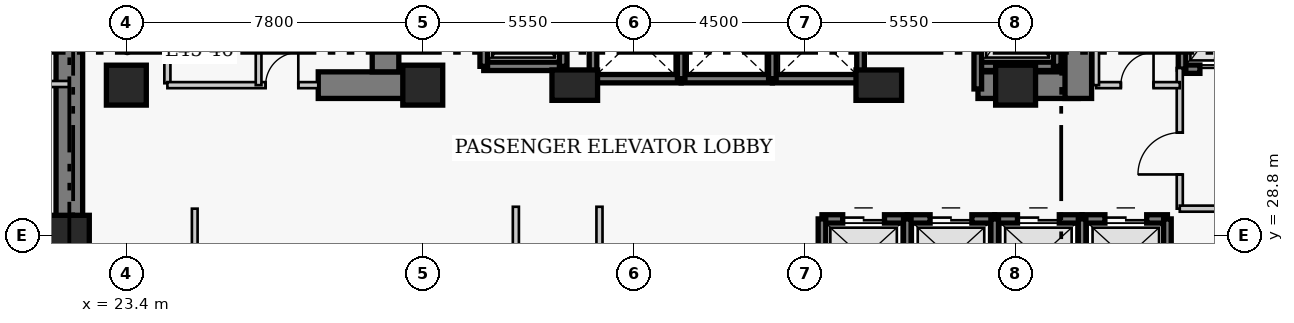
"""IFC4 building model, lengths in metres.
Left out: names, types, materials, properties, quantities, classifications, styles, units other than length and angle.
Written with IfcOpenShell. Run it as: python <this file> out.ifc"""

import sys

from ifc_helpers import new_model, si_unit, direction, frame, frame_2d, origin, origin_2d, place, context, subcontext, project, spatial, rectangle, extrude, element, fill, save


model = new_model("IFC4")
c1 = context("Model", 3, precision=1e-05, world=origin(), true_north=direction((0.0, 1.0)))
c2 = subcontext(c1, "Body", "Model", "MODEL_VIEW")
j1 = project(units=[si_unit("LENGTHUNIT", "METRE"), si_unit("PLANEANGLEUNIT", "RADIAN")], contexts=[c1])
p1 = place(None, origin())
s1 = spatial("IfcSite", under=j1, at=p1, CompositionType="ELEMENT")
p2 = place(p1, origin())
s2 = spatial("IfcBuilding", under=s1, at=p2, CompositionType="ELEMENT")
p3 = place(p2, frame((0.0, 0.0, 180.2)))
s3 = spatial("IfcBuildingStorey", under=s2, at=p3, CompositionType="ELEMENT", Elevation=180.2)
p4 = place(p3, frame((21.9, 27.05, 0.0), z_axis=(0.0, 0.0, 1.0), x_axis=(0.0, 1.0, 0.0)))
e1 = element("IfcWall", 1, at=p4, inside=s3, PredefinedType="SHEAR", context=c2, shape_type="SweptSolid", body=[
    extrude(rectangle(XDim=13.62, YDim=0.7, at=frame_2d((6.81, 0.0))), origin(), (0.0, 0.0, 1.0), 3.8),
])
p5 = place(p3, frame((28.45, 32.75, 0.0), z_axis=(0.0, 0.0, 1.0), x_axis=(1.0, 0.0, 0.0)))
e2 = element("IfcWall", 2, at=p5, inside=s3, PredefinedType="SHEAR", context=c2, shape_type="SweptSolid", body=[
    extrude(rectangle(XDim=2.4, YDim=0.7, at=frame_2d((1.2, 0.0))), origin(), (0.0, 0.0, 1.0), 3.8),
])
p6 = place(p3, frame((45.81, 32.75, 0.0), z_axis=(0.0, 0.0, 1.0), x_axis=(1.0, 0.0, 0.0)))
e3 = element("IfcWall", 3, at=p6, inside=s3, PredefinedType="SHEAR", context=c2, shape_type="SweptSolid", body=[
    extrude(rectangle(XDim=2.64, YDim=0.7, at=frame_2d((1.32, 0.0))), origin(), (0.0, 0.0, 1.0), 3.8),
])
p7 = place(p3, frame((30.22, 33.1, 0.0), z_axis=(0.0, 0.0, 1.0), x_axis=(0.0, 1.0, 0.0)))
e4 = element("IfcWall", 4, at=p7, inside=s3, PredefinedType="SHEAR", context=c2, shape_type="SweptSolid", body=[
    extrude(rectangle(XDim=7.22, YDim=0.7, at=frame_2d((3.61, 0.0))), origin(), (0.0, 0.0, 1.0), 3.8),
])
p8 = place(p3, frame((48.45, 32.4, 0.0), z_axis=(0.0, 0.0, 1.0), x_axis=(0.0, 1.0, 0.0)))
e5 = element("IfcWall", 5, at=p8, inside=s3, PredefinedType="SHEAR", context=c2, shape_type="SweptSolid", body=[
    extrude(rectangle(XDim=7.92, YDim=0.7, at=frame_2d((3.96, 0.0))), origin(), (0.0, 0.0, 1.0), 3.8),
])
p9 = place(p8, frame((5.8, 0.0, 0.0)))
e6 = element("IfcOpeningElement", 6, at=p9, cuts=e5, PredefinedType="OPENING", context=c2, shape_type="SweptSolid", body=[
    extrude(rectangle(XDim=1.1, YDim=2.15, at=frame_2d((0.55, 1.075))), frame((0.0, 0.36, 0.0), z_axis=(0.0, -1.0, 0.0), x_axis=(1.0, 0.0, 0.0)), (0.0, 0.0, 1.0), 0.72),
])
for number, where, z_axis, x_axis in (
    (7, (21.9, 28.8, 0.0), (0.0, 0.0, 1.0), (1.0, 0.0, 0.0)),
    (8, (23.4, 32.75, 0.0), (0.0, 0.0, 1.0), (1.0, 0.0, 0.0)),
    (9, (31.2, 32.75, 0.0), (0.0, 0.0, 1.0), (1.0, 0.0, 0.0)),
):
    element("IfcColumn", number, at=place(p3, frame(where, z_axis=z_axis, x_axis=x_axis)), inside=s3, PredefinedType="COLUMN", context=c2, shape_type="SweptSolid", body=[
        extrude(rectangle(XDim=1.05, YDim=1.05, at=origin_2d()), origin(), (0.0, 0.0, 1.0), 3.8),
    ])
for number, where, z_axis, x_axis in (
    (10, (35.2, 32.75, 0.0), (0.0, 0.0, 1.0), (1.0, 0.0, 0.0)),
    (11, (43.2, 32.75, 0.0), (0.0, 0.0, 1.0), (1.0, 0.0, 0.0)),
):
    element("IfcColumn", number, at=place(p3, frame(where, z_axis=z_axis, x_axis=x_axis)), inside=s3, PredefinedType="COLUMN", context=c2, shape_type="SweptSolid", body=[
        extrude(rectangle(XDim=1.2, YDim=0.8, at=origin_2d()), origin(), (0.0, 0.0, 1.0), 3.8),
    ])
p10 = place(p3, frame((46.8, 32.75, 0.0), z_axis=(0.0, 0.0, 1.0), x_axis=(1.0, 0.0, 0.0)))
e12 = element("IfcColumn", 12, at=p10, inside=s3, PredefinedType="COLUMN", context=c2, shape_type="SweptSolid", body=[
    extrude(rectangle(XDim=1.05, YDim=1.05, at=origin_2d()), origin(), (0.0, 0.0, 1.0), 3.8),
])
p11 = place(p3, frame((41.705, 29.23, 0.0), z_axis=(0.0, 0.0, 1.0), x_axis=(1.0, 0.0, 0.0)))
e13 = element("IfcWall", 13, at=p11, inside=s3, PredefinedType="SHEAR", context=c2, shape_type="SweptSolid", body=[
    extrude(rectangle(XDim=2.245, YDim=0.22, at=frame_2d((1.123, 0.0))), origin(), (0.0, 0.0, 1.0), 3.8),
])
p12 = place(p11, frame((0.545, 0.0, 0.0)))
e14 = element("IfcOpeningElement", 14, at=p12, cuts=e13, PredefinedType="OPENING", context=c2, shape_type="SweptSolid", body=[
    extrude(rectangle(XDim=1.1, YDim=2.15, at=frame_2d((0.55, 1.075))), frame((0.0, 0.12, 0.0), z_axis=(0.0, -1.0, 0.0), x_axis=(1.0, 0.0, 0.0)), (0.0, 0.0, 1.0), 0.24),
])
p13 = place(p3, frame((41.705, 27.17, 0.0), z_axis=(0.0, 0.0, 1.0), x_axis=(0.0, 1.0, 0.0)))
e15 = element("IfcWall", 15, at=p13, inside=s3, PredefinedType="SHEAR", context=c2, shape_type="SweptSolid", body=[
    extrude(rectangle(XDim=2.06, YDim=0.2, at=frame_2d((1.03, 0.0))), origin(), (0.0, 0.0, 1.0), 3.8),
])
p14 = place(p3, frame((43.95, 29.23, 0.0), z_axis=(0.0, 0.0, 1.0), x_axis=(1.0, 0.0, 0.0)))
e16 = element("IfcWall", 16, at=p14, inside=s3, PredefinedType="SHEAR", context=c2, shape_type="SweptSolid", body=[
    extrude(rectangle(XDim=2.3, YDim=0.22, at=frame_2d((1.15, 0.0))), origin(), (0.0, 0.0, 1.0), 3.8),
])
p15 = place(p14, frame((0.6, 0.0, 0.0)))
e17 = element("IfcOpeningElement", 17, at=p15, cuts=e16, PredefinedType="OPENING", context=c2, shape_type="SweptSolid", body=[
    extrude(rectangle(XDim=1.1, YDim=2.15, at=frame_2d((0.55, 1.075))), frame((0.0, 0.12, 0.0), z_axis=(0.0, -1.0, 0.0), x_axis=(1.0, 0.0, 0.0)), (0.0, 0.0, 1.0), 0.24),
])
p16 = place(p3, frame((43.95, 27.17, 0.0), z_axis=(0.0, 0.0, 1.0), x_axis=(0.0, 1.0, 0.0)))
e18 = element("IfcWall", 18, at=p16, inside=s3, PredefinedType="SHEAR", context=c2, shape_type="SweptSolid", body=[
    extrude(rectangle(XDim=2.06, YDim=0.2, at=frame_2d((1.03, 0.0))), origin(), (0.0, 0.0, 1.0), 3.8),
])
p17 = place(p3, frame((46.25, 29.23, 0.0), z_axis=(0.0, 0.0, 1.0), x_axis=(1.0, 0.0, 0.0)))
e19 = element("IfcWall", 19, at=p17, inside=s3, PredefinedType="SHEAR", context=c2, shape_type="SweptSolid", body=[
    extrude(rectangle(XDim=2.3, YDim=0.22, at=frame_2d((1.15, 0.0))), origin(), (0.0, 0.0, 1.0), 3.8),
])
p18 = place(p17, frame((0.6, 0.0, 0.0)))
e20 = element("IfcOpeningElement", 20, at=p18, cuts=e19, PredefinedType="OPENING", context=c2, shape_type="SweptSolid", body=[
    extrude(rectangle(XDim=1.1, YDim=2.15, at=frame_2d((0.55, 1.075))), frame((0.0, 0.12, 0.0), z_axis=(0.0, -1.0, 0.0), x_axis=(1.0, 0.0, 0.0)), (0.0, 0.0, 1.0), 0.24),
])
p19 = place(p3, frame((46.25, 27.17, 0.0), z_axis=(0.0, 0.0, 1.0), x_axis=(0.0, 1.0, 0.0)))
e21 = element("IfcWall", 21, at=p19, inside=s3, PredefinedType="SHEAR", context=c2, shape_type="SweptSolid", body=[
    extrude(rectangle(XDim=2.06, YDim=0.2, at=frame_2d((1.03, 0.0))), origin(), (0.0, 0.0, 1.0), 3.8),
])
p20 = place(p3, frame((48.55, 29.23, 0.0), z_axis=(0.0, 0.0, 1.0), x_axis=(1.0, 0.0, 0.0)))
e22 = element("IfcWall", 22, at=p20, inside=s3, PredefinedType="SHEAR", context=c2, shape_type="SweptSolid", body=[
    extrude(rectangle(XDim=2.245, YDim=0.22, at=frame_2d((1.123, 0.0))), origin(), (0.0, 0.0, 1.0), 3.8),
])
p21 = place(p20, frame((0.6, 0.0, 0.0)))
e23 = element("IfcOpeningElement", 23, at=p21, cuts=e22, PredefinedType="OPENING", context=c2, shape_type="SweptSolid", body=[
    extrude(rectangle(XDim=1.1, YDim=2.15, at=frame_2d((0.55, 1.075))), frame((0.0, 0.12, 0.0), z_axis=(0.0, -1.0, 0.0), x_axis=(1.0, 0.0, 0.0)), (0.0, 0.0, 1.0), 0.24),
])
for number, where, z_axis, x_axis in (
    (24, (48.55, 27.17, 0.0), (0.0, 0.0, 1.0), (0.0, 1.0, 0.0)),
    (25, (50.795, 27.17, 0.0), (0.0, 0.0, 1.0), (0.0, 1.0, 0.0)),
):
    element("IfcWall", number, at=place(p3, frame(where, z_axis=z_axis, x_axis=x_axis)), inside=s3, PredefinedType="SHEAR", context=c2, shape_type="SweptSolid", body=[
        extrude(rectangle(XDim=2.06, YDim=0.2, at=frame_2d((1.03, 0.0))), origin(), (0.0, 0.0, 1.0), 3.8),
    ])
p22 = place(p3, frame((35.68, 32.92, 0.0), z_axis=(0.0, 0.0, 1.0), x_axis=(1.0, 0.0, 0.0)))
e26 = element("IfcWall", 26, at=p22, inside=s3, PredefinedType="SHEAR", context=c2, shape_type="SweptSolid", body=[
    extrude(rectangle(XDim=2.32, YDim=0.22, at=frame_2d((1.16, 0.0))), origin(), (0.0, 0.0, 1.0), 3.8),
])
p23 = place(p3, frame((35.68, 32.92, 0.0), z_axis=(0.0, 0.0, 1.0), x_axis=(0.0, 1.0, 0.0)))
e27 = element("IfcWall", 27, at=p23, inside=s3, PredefinedType="SHEAR", context=c2, shape_type="SweptSolid", body=[
    extrude(rectangle(XDim=2.16, YDim=0.2, at=frame_2d((1.08, 0.0))), origin(), (0.0, 0.0, 1.0), 3.8),
])
p24 = place(p3, frame((38.0, 32.92, 0.0), z_axis=(0.0, 0.0, 1.0), x_axis=(1.0, 0.0, 0.0)))
e28 = element("IfcWall", 28, at=p24, inside=s3, PredefinedType="SHEAR", context=c2, shape_type="SweptSolid", body=[
    extrude(rectangle(XDim=2.4, YDim=0.22, at=frame_2d((1.2, 0.0))), origin(), (0.0, 0.0, 1.0), 3.8),
])
p25 = place(p3, frame((38.0, 32.92, 0.0), z_axis=(0.0, 0.0, 1.0), x_axis=(0.0, 1.0, 0.0)))
e29 = element("IfcWall", 29, at=p25, inside=s3, PredefinedType="SHEAR", context=c2, shape_type="SweptSolid", body=[
    extrude(rectangle(XDim=2.16, YDim=0.2, at=frame_2d((1.08, 0.0))), origin(), (0.0, 0.0, 1.0), 3.8),
])
p26 = place(p3, frame((40.4, 32.92, 0.0), z_axis=(0.0, 0.0, 1.0), x_axis=(1.0, 0.0, 0.0)))
e30 = element("IfcWall", 30, at=p26, inside=s3, PredefinedType="SHEAR", context=c2, shape_type="SweptSolid", body=[
    extrude(rectangle(XDim=2.32, YDim=0.22, at=frame_2d((1.16, 0.0))), origin(), (0.0, 0.0, 1.0), 3.8),
])
for number, where, z_axis, x_axis in (
    (31, (40.4, 32.92, 0.0), (0.0, 0.0, 1.0), (0.0, 1.0, 0.0)),
    (32, (42.72, 32.92, 0.0), (0.0, 0.0, 1.0), (0.0, 1.0, 0.0)),
):
    element("IfcWall", number, at=place(p3, frame(where, z_axis=z_axis, x_axis=x_axis)), inside=s3, PredefinedType="SHEAR", context=c2, shape_type="SweptSolid", body=[
        extrude(rectangle(XDim=2.16, YDim=0.2, at=frame_2d((1.08, 0.0))), origin(), (0.0, 0.0, 1.0), 3.8),
    ])
p27 = place(p3, frame((51.18, 33.17, 0.0), z_axis=(0.0, 0.0, 1.0), x_axis=(1.0, 0.0, 0.0)))
e33 = element("IfcWall", 33, at=p27, inside=s3, PredefinedType="SHEAR", context=c2, shape_type="SweptSolid", body=[
    extrude(rectangle(XDim=2.42, YDim=0.22, at=frame_2d((1.21, 0.0))), origin(), (0.0, 0.0, 1.0), 3.8),
])
p28 = place(p27, frame((0.47, 0.0, 0.0)))
e34 = element("IfcOpeningElement", 34, at=p28, cuts=e33, PredefinedType="OPENING", context=c2, shape_type="SweptSolid", body=[
    extrude(rectangle(XDim=1.3, YDim=2.15, at=frame_2d((0.65, 1.075))), frame((0.0, 0.12, 0.0), z_axis=(0.0, -1.0, 0.0), x_axis=(1.0, 0.0, 0.0)), (0.0, 0.0, 1.0), 0.24),
])
p29 = place(p3, frame((51.18, 33.17, 0.0), z_axis=(0.0, 0.0, 1.0), x_axis=(0.0, 1.0, 0.0)))
e35 = element("IfcWall", 35, at=p29, inside=s3, PredefinedType="SHEAR", context=c2, shape_type="SweptSolid", body=[
    extrude(rectangle(XDim=2.86, YDim=0.2, at=frame_2d((1.43, 0.0))), origin(), (0.0, 0.0, 1.0), 3.8),
])
p30 = place(p3, frame((32.805, 33.245, 0.0), z_axis=(0.0, 0.0, 1.0), x_axis=(1.0, 0.0, 0.0)))
e36 = element("IfcWall", 36, at=p30, inside=s3, PredefinedType="SHEAR", context=c2, shape_type="SweptSolid", body=[
    extrude(rectangle(XDim=2.09, YDim=0.22, at=frame_2d((1.045, 0.0))), origin(), (0.0, 0.0, 1.0), 3.8),
])
for number, where, z_axis, x_axis in (
    (37, (32.805, 33.245, 0.0), (0.0, 0.0, 1.0), (0.0, 1.0, 0.0)),
    (38, (34.895, 33.245, 0.0), (0.0, 0.0, 1.0), (0.0, 1.0, 0.0)),
):
    element("IfcWall", number, at=place(p3, frame(where, z_axis=z_axis, x_axis=x_axis)), inside=s3, PredefinedType="SHEAR", context=c2, shape_type="SweptSolid", body=[
        extrude(rectangle(XDim=2.91, YDim=0.2, at=frame_2d((1.455, 0.0))), origin(), (0.0, 0.0, 1.0), 3.8),
    ])
p31 = place(p3, frame((45.805, 33.245, 0.0), z_axis=(0.0, 0.0, 1.0), x_axis=(1.0, 0.0, 0.0)))
e39 = element("IfcWall", 39, at=p31, inside=s3, PredefinedType="SHEAR", context=c2, shape_type="SweptSolid", body=[
    extrude(rectangle(XDim=2.09, YDim=0.22, at=frame_2d((1.045, 0.0))), origin(), (0.0, 0.0, 1.0), 3.8),
])
p32 = place(p3, frame((45.805, 32.65, 0.0), z_axis=(0.0, 0.0, 1.0), x_axis=(0.0, 1.0, 0.0)))
e40 = element("IfcWall", 40, at=p32, inside=s3, PredefinedType="SHEAR", context=c2, shape_type="SweptSolid", body=[
    extrude(rectangle(XDim=3.505, YDim=0.2, at=frame_2d((1.752, 0.0))), origin(), (0.0, 0.0, 1.0), 3.8),
])
p33 = place(p3, frame((47.895, 33.245, 0.0), z_axis=(0.0, 0.0, 1.0), x_axis=(0.0, 1.0, 0.0)))
e41 = element("IfcWall", 41, at=p33, inside=s3, PredefinedType="SHEAR", context=c2, shape_type="SweptSolid", body=[
    extrude(rectangle(XDim=2.91, YDim=0.2, at=frame_2d((1.455, 0.0))), origin(), (0.0, 0.0, 1.0), 3.8),
])
p34 = place(p3, frame((24.48, 32.8, 0.0), z_axis=(0.0, 0.0, 1.0), x_axis=(0.0, 1.0, 0.0)))
e42 = element("IfcWall", 42, at=p34, inside=s3, PredefinedType="PARTITIONING", context=c2, shape_type="SweptSolid", body=[
    extrude(rectangle(XDim=3.57, YDim=0.16, at=frame_2d((1.785, 0.0))), origin(), (0.0, 0.0, 1.0), 3.42),
])
p35 = place(p34, frame((1.604, 0.0, 0.0)))
e43 = element("IfcOpeningElement", 43, at=p35, cuts=e42, PredefinedType="OPENING", context=c2, shape_type="SweptSolid", body=[
    extrude(rectangle(XDim=0.9, YDim=2.1, at=frame_2d((0.45, 1.05))), frame((0.0, 0.09, 0.0), z_axis=(0.0, -1.0, 0.0), x_axis=(1.0, 0.0, 0.0)), (0.0, 0.0, 1.0), 0.18),
])
p36 = place(p3, frame((51.12, 29.5, 0.0), z_axis=(0.0, 0.0, 1.0), x_axis=(0.0, 1.0, 0.0)))
e44 = element("IfcWall", 44, at=p36, inside=s3, PredefinedType="PARTITIONING", context=c2, shape_type="SweptSolid", body=[
    extrude(rectangle(XDim=3.7, YDim=0.16, at=frame_2d((1.85, 0.0))), origin(), (0.0, 0.0, 1.0), 3.42),
])
p37 = place(p36, frame((0.9, 0.0, 0.0)))
e45 = element("IfcOpeningElement", 45, at=p37, cuts=e44, PredefinedType="OPENING", context=c2, shape_type="SweptSolid", body=[
    extrude(rectangle(XDim=1.1, YDim=2.15, at=frame_2d((0.55, 1.075))), frame((0.0, 0.09, 0.0), z_axis=(0.0, -1.0, 0.0), x_axis=(1.0, 0.0, 0.0)), (0.0, 0.0, 1.0), 0.18),
])
p38 = place(p3, frame((51.12, 29.5, 0.0), z_axis=(0.0, 0.0, 1.0), x_axis=(1.0, 0.0, 0.0)))
e46 = element("IfcWall", 46, at=p38, inside=s3, PredefinedType="PARTITIONING", context=c2, shape_type="SweptSolid", body=[
    extrude(rectangle(XDim=5.63, YDim=0.16, at=frame_2d((2.815, 0.0))), origin(), (0.0, 0.0, 1.0), 3.42),
])
p39 = place(p3, frame((24.48, 32.75, 0.0), z_axis=(0.0, 0.0, 1.0), x_axis=(1.0, 0.0, 0.0)))
e47 = element("IfcWall", 47, at=p39, inside=s3, PredefinedType="PARTITIONING", context=c2, shape_type="SweptSolid", body=[
    extrude(rectangle(XDim=3.97, YDim=0.16, at=frame_2d((1.985, 0.0))), origin(), (0.0, 0.0, 1.0), 3.42),
])
p40 = place(p39, frame((2.585, 0.0, 0.0)))
e48 = element("IfcOpeningElement", 48, at=p40, cuts=e47, PredefinedType="OPENING", context=c2, shape_type="SweptSolid", body=[
    extrude(rectangle(XDim=0.86, YDim=2.05, at=frame_2d((0.43, 1.025))), frame((0.0, 0.09, 0.0), z_axis=(0.0, -1.0, 0.0), x_axis=(1.0, 0.0, 0.0)), (0.0, 0.0, 1.0), 0.18),
])
p41 = place(p3, frame((48.92, 32.75, 0.0), z_axis=(0.0, 0.0, 1.0), x_axis=(1.0, 0.0, 0.0)))
e49 = element("IfcWall", 49, at=p41, inside=s3, PredefinedType="PARTITIONING", context=c2, shape_type="SweptSolid", body=[
    extrude(rectangle(XDim=2.2, YDim=0.16, at=frame_2d((1.1, 0.0))), origin(), (0.0, 0.0, 1.0), 3.42),
])
p42 = place(p41, frame((0.65, 0.0, 0.0)))
e50 = element("IfcOpeningElement", 50, at=p42, cuts=e49, PredefinedType="OPENING", context=c2, shape_type="SweptSolid", body=[
    extrude(rectangle(XDim=0.86, YDim=2.05, at=frame_2d((0.43, 1.025))), frame((0.0, 0.09, 0.0), z_axis=(0.0, -1.0, 0.0), x_axis=(1.0, 0.0, 0.0)), (0.0, 0.0, 1.0), 0.18),
])
for number, where, z_axis, x_axis in (
    (51, (48.92, 32.75, 0.0), (0.0, 0.0, 1.0), (0.0, 1.0, 0.0)),
    (52, (26.88, 32.75, 0.0), (0.0, 0.0, 1.0), (0.0, 1.0, 0.0)),
):
    element("IfcWall", number, at=place(p3, frame(where, z_axis=z_axis, x_axis=x_axis)), inside=s3, PredefinedType="PARTITIONING", context=c2, shape_type="SweptSolid", body=[
        extrude(rectangle(XDim=3.62, YDim=0.15, at=frame_2d((1.81, 0.0))), origin(), (0.0, 0.0, 1.0), 3.42),
    ])
for number, where, z_axis, x_axis in (
    (53, (33.65, 19.16, 0.0), (0.0, 0.0, 1.0), (0.0, 1.0, 0.0)),
    (54, (35.85, 19.16, 0.0), (0.0, 0.0, 1.0), (0.0, 1.0, 0.0)),
):
    element("IfcWall", number, at=place(p3, frame(where, z_axis=z_axis, x_axis=x_axis)), inside=s3, PredefinedType="PARTITIONING", context=c2, shape_type="SweptSolid", body=[
        extrude(rectangle(XDim=10.39, YDim=0.16, at=frame_2d((5.195, 0.0))), origin(), (0.0, 0.0, 1.0), 3.42),
    ])
p43 = place(p3, frame((19.96, 32.78, 0.0), z_axis=(0.0, 0.0, 1.0), x_axis=(1.0, 0.0, 0.0)))
e55 = element("IfcWall", 55, at=p43, inside=s3, PredefinedType="PARTITIONING", context=c2, shape_type="SweptSolid", body=[
    extrude(rectangle(XDim=1.94, YDim=0.16, at=frame_2d((0.97, 0.0))), origin(), (0.0, 0.0, 1.0), 3.42),
])
p44 = place(p3, frame((25.2, 19.16, 0.0), z_axis=(0.0, 0.0, 1.0), x_axis=(0.0, 1.0, 0.0)))
e56 = element("IfcWall", 56, at=p44, inside=s3, PredefinedType="PARTITIONING", context=c2, shape_type="SweptSolid", body=[
    extrude(rectangle(XDim=10.34, YDim=0.15, at=frame_2d((5.17, 0.0))), origin(), (0.0, 0.0, 1.0), 3.42),
])
p45 = place(p12, origin())
e57 = element("IfcDoor", 57, at=p45, inside=s3, OperationType="DOUBLE_DOOR_SLIDING", PredefinedType="DOOR", context=c2, shape_type="SweptSolid", body=[
    extrude(rectangle(XDim=1.1, YDim=2.15, at=frame_2d((0.55, 1.075))), frame((0.0, 0.025, 0.0), z_axis=(0.0, -1.0, 0.0), x_axis=(1.0, 0.0, 0.0)), (0.0, 0.0, 1.0), 0.05),
])
fill(e14, e57)
p46 = place(p15, origin())
e58 = element("IfcDoor", 58, at=p46, inside=s3, OperationType="DOUBLE_DOOR_SLIDING", PredefinedType="DOOR", context=c2, shape_type="SweptSolid", body=[
    extrude(rectangle(XDim=1.1, YDim=2.15, at=frame_2d((0.55, 1.075))), frame((0.0, 0.025, 0.0), z_axis=(0.0, -1.0, 0.0), x_axis=(1.0, 0.0, 0.0)), (0.0, 0.0, 1.0), 0.05),
])
fill(e17, e58)
p47 = place(p18, origin())
e59 = element("IfcDoor", 59, at=p47, inside=s3, OperationType="DOUBLE_DOOR_SLIDING", PredefinedType="DOOR", context=c2, shape_type="SweptSolid", body=[
    extrude(rectangle(XDim=1.1, YDim=2.15, at=frame_2d((0.55, 1.075))), frame((0.0, 0.025, 0.0), z_axis=(0.0, -1.0, 0.0), x_axis=(1.0, 0.0, 0.0)), (0.0, 0.0, 1.0), 0.05),
])
fill(e20, e59)
p48 = place(p21, origin())
e60 = element("IfcDoor", 60, at=p48, inside=s3, OperationType="DOUBLE_DOOR_SLIDING", PredefinedType="DOOR", context=c2, shape_type="SweptSolid", body=[
    extrude(rectangle(XDim=1.1, YDim=2.15, at=frame_2d((0.55, 1.075))), frame((0.0, 0.025, 0.0), z_axis=(0.0, -1.0, 0.0), x_axis=(1.0, 0.0, 0.0)), (0.0, 0.0, 1.0), 0.05),
])
fill(e23, e60)
p49 = place(p28, origin())
e61 = element("IfcDoor", 61, at=p49, inside=s3, OperationType="DOUBLE_DOOR_SLIDING", PredefinedType="DOOR", context=c2, shape_type="SweptSolid", body=[
    extrude(rectangle(XDim=1.3, YDim=2.15, at=frame_2d((0.65, 1.075))), frame((0.0, 0.025, 0.0), z_axis=(0.0, -1.0, 0.0), x_axis=(1.0, 0.0, 0.0)), (0.0, 0.0, 1.0), 0.05),
])
fill(e34, e61)
p50 = place(p37, origin())
e62 = element("IfcDoor", 62, at=p50, inside=s3, OperationType="SINGLE_SWING_LEFT", PredefinedType="DOOR", context=c2, shape_type="SweptSolid", body=[
    extrude(rectangle(XDim=1.1, YDim=2.15, at=frame_2d((0.55, 1.075))), frame((0.0, 0.025, 0.0), z_axis=(0.0, -1.0, 0.0), x_axis=(1.0, 0.0, 0.0)), (0.0, 0.0, 1.0), 0.05),
])
fill(e45, e62)
p51 = place(p40, origin())
e63 = element("IfcDoor", 63, at=p51, inside=s3, OperationType="SINGLE_SWING_RIGHT", PredefinedType="DOOR", context=c2, shape_type="SweptSolid", body=[
    extrude(rectangle(XDim=0.86, YDim=2.05, at=frame_2d((0.43, 1.025))), frame((0.0, 0.025, 0.0), z_axis=(0.0, -1.0, 0.0), x_axis=(1.0, 0.0, 0.0)), (0.0, 0.0, 1.0), 0.05),
])
fill(e48, e63)
p52 = place(p42, origin())
e64 = element("IfcDoor", 64, at=p52, inside=s3, OperationType="SINGLE_SWING_RIGHT", PredefinedType="DOOR", context=c2, shape_type="SweptSolid", body=[
    extrude(rectangle(XDim=0.86, YDim=2.05, at=frame_2d((0.43, 1.025))), frame((0.0, 0.025, 0.0), z_axis=(0.0, -1.0, 0.0), x_axis=(1.0, 0.0, 0.0)), (0.0, 0.0, 1.0), 0.05),
])
fill(e50, e64)
save(model, sys.argv[1])
